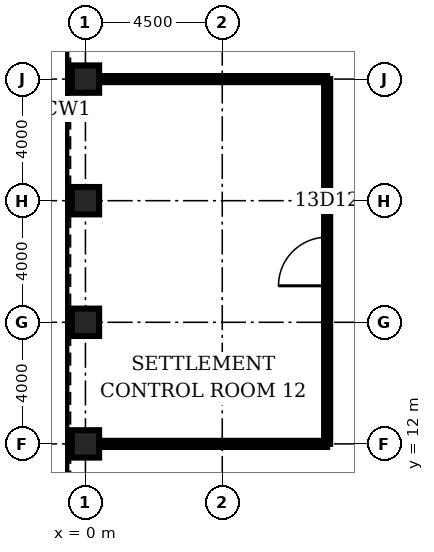
"""IFC4 building model, lengths in metres.
Left out: names, types, materials, properties, quantities, classifications, styles, units other than length and angle.
Written with IfcOpenShell. Run it as: python <this file> out.ifc"""

import sys

from ifc_helpers import new_model, si_unit, direction, frame, frame_2d, origin, origin_2d, place, context, subcontext, project, spatial, rectangle, hollow_rectangle, extrude, element, fill, save


model = new_model("IFC4")
c1 = context("Model", 3, precision=1e-05, world=origin(), true_north=direction((0.0, 1.0)))
c2 = subcontext(c1, "Body", "Model", "MODEL_VIEW")
j1 = project(units=[si_unit("LENGTHUNIT", "METRE"), si_unit("PLANEANGLEUNIT", "RADIAN")], contexts=[c1])
p1 = place(None, origin())
s1 = spatial("IfcSite", under=j1, at=p1, CompositionType="ELEMENT")
p2 = place(p1, origin())
s2 = spatial("IfcBuilding", under=s1, at=p2, CompositionType="ELEMENT")
p3 = place(p2, frame((0.0, 0.0, 63.5)))
s3 = spatial("IfcBuildingStorey", under=s2, at=p3, CompositionType="ELEMENT", Elevation=63.5)
for number, where, z_axis, x_axis in (
    (1, (0.0, 24.0, 0.0), (0.0, 0.0, 1.0), (1.0, 0.0, 0.0)),
    (2, (0.0, 20.0, 0.0), (0.0, 0.0, 1.0), (1.0, 0.0, 0.0)),
    (3, (0.0, 16.0, 0.0), (0.0, 0.0, 1.0), (1.0, 0.0, 0.0)),
    (4, (0.0, 12.0, 0.0), (0.0, 0.0, 1.0), (1.0, 0.0, 0.0)),
):
    element("IfcColumn", number, at=place(p3, frame(where, z_axis=z_axis, x_axis=x_axis)), inside=s3, PredefinedType="COLUMN", context=c2, shape_type="SweptSolid", body=[
        extrude(hollow_rectangle(XDim=0.9, YDim=0.9, WallThickness=0.12, at=origin_2d()), origin(), (0.0, 0.0, 1.0), 4.5),
    ])
for number, where, z_axis, x_axis in (
    (5, (0.45, 12.0, 0.0), (0.0, 0.0, 1.0), (1.0, 0.0, 0.0)),
    (6, (0.45, 24.0, 0.0), (0.0, 0.0, 1.0), (1.0, 0.0, 0.0)),
):
    element("IfcWall", number, at=place(p3, frame(where, z_axis=z_axis, x_axis=x_axis)), inside=s3, PredefinedType="PARTITIONING", context=c2, shape_type="SweptSolid", body=[
        extrude(rectangle(XDim=7.5, YDim=0.2, at=frame_2d((3.75, 0.0))), origin(), (0.0, 0.0, 1.0), 3.0),
    ])
p4 = place(p3, frame((7.95, 12.0, 0.0), z_axis=(0.0, 0.0, 1.0), x_axis=(0.0, 1.0, 0.0)))
e7 = element("IfcWall", 7, at=p4, inside=s3, PredefinedType="PARTITIONING", context=c2, shape_type="SweptSolid", body=[
    extrude(rectangle(XDim=12.0, YDim=0.2, at=frame_2d((6.0, 0.0))), origin(), (0.0, 0.0, 1.0), 3.0),
])
p5 = place(p4, frame((5.2, 0.0, 0.0)))
e8 = element("IfcOpeningElement", 8, at=p5, cuts=e7, PredefinedType="OPENING", context=c2, shape_type="SweptSolid", body=[
    extrude(rectangle(XDim=1.6, YDim=2.1, at=frame_2d((0.8, 1.05))), frame((0.0, 0.11, 0.0), z_axis=(0.0, -1.0, 0.0), x_axis=(1.0, 0.0, 0.0)), (0.0, 0.0, 1.0), 0.22),
])
p6 = place(p5, origin())
e9 = element("IfcDoor", 9, at=p6, inside=s3, OperationType="SINGLE_SWING_LEFT", PredefinedType="DOOR", context=c2, shape_type="SweptSolid", body=[
    extrude(rectangle(XDim=1.6, YDim=2.1, at=frame_2d((0.8, 1.05))), frame((0.0, 0.025, 0.0), z_axis=(0.0, -1.0, 0.0), x_axis=(1.0, 0.0, 0.0)), (0.0, 0.0, 1.0), 0.05),
])
fill(e8, e9)
save(model, sys.argv[1])
